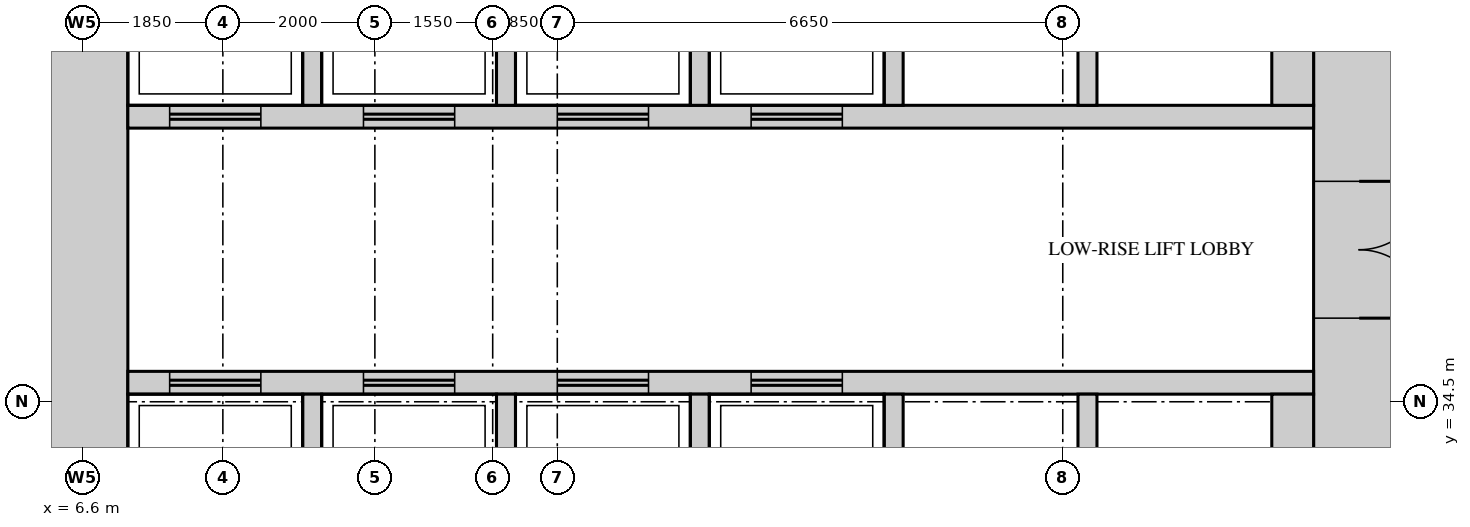
"""IFC4 building model, lengths in metres.
Left out: names, types, materials, properties, quantities, classifications, styles, units other than length and angle.
Written with IfcOpenShell. Run it as: python <this file> out.ifc"""

import sys

from ifc_helpers import new_model, si_unit, direction, frame, frame_2d, origin, place, context, subcontext, project, spatial, rectangle, extrude, source, transform, mapped, element, fill, save


model = new_model("IFC4")
c1 = context("Model", 3, precision=1e-05, world=origin(), true_north=direction((0.0, 1.0)))
c2 = subcontext(c1, "Body", "Model", "MODEL_VIEW")
j1 = project(units=[si_unit("LENGTHUNIT", "METRE"), si_unit("PLANEANGLEUNIT", "RADIAN")], contexts=[c1])
p1 = place(None, origin())
s1 = spatial("IfcSite", under=j1, at=p1, CompositionType="ELEMENT")
p2 = place(p1, origin())
s2 = spatial("IfcBuilding", under=s1, at=p2, CompositionType="ELEMENT")
p3 = place(p2, frame((0.0, 0.0, 87.0)))
s3 = spatial("IfcBuildingStorey", under=s2, at=p3, CompositionType="ELEMENT", Elevation=87.0)
m1 = source(origin(), c2, "Body", "SweptSolid", [
    extrude(rectangle(XDim=27.6, YDim=1.2, at=frame_2d((13.8, 0.0))), origin(), (0.0, 0.0, 1.0), 4.2),
])
p4 = place(p3, frame((23.4, 13.2, 0.0), z_axis=(0.0, 0.0, 1.0), x_axis=(0.0, 1.0, 0.0)))
e1 = element("IfcWall", 1, at=p4, inside=s3, PredefinedType="SHEAR", context=c2, shape_type="MappedRepresentation", body=[
    mapped(m1, transform((0.0, 0.0, 0.0))),
])
m2 = source(origin(), c2, "Body", "SweptSolid", [
    extrude(rectangle(XDim=1.8, YDim=2.1, at=frame_2d((0.9, 1.05))), frame((0.0, 0.61, 0.0), z_axis=(0.0, -1.0, 0.0), x_axis=(1.0, 0.0, 0.0)), (0.0, 0.0, 1.0), 1.22),
])
p5 = place(p4, frame((22.4, 0.0, 0.0)))
e2 = element("IfcOpeningElement", 2, at=p5, cuts=e1, PredefinedType="OPENING", context=c2, shape_type="MappedRepresentation", body=[
    mapped(m2, transform((0.0, 0.0, 0.0))),
])
m3 = source(origin(), c2, "Body", "SweptSolid", [
    extrude(rectangle(XDim=1.2, YDim=2.1, at=frame_2d((0.6, 1.05))), frame((0.0, 0.61, 0.0), z_axis=(0.0, -1.0, 0.0), x_axis=(1.0, 0.0, 0.0)), (0.0, 0.0, 1.0), 1.22),
])
p6 = place(p4, frame((12.9, 0.0, 0.0)))
e3 = element("IfcOpeningElement", 3, at=p6, cuts=e1, PredefinedType="OPENING", context=c2, shape_type="MappedRepresentation", body=[
    mapped(m3, transform((0.0, 0.0, 0.0))),
])
m4 = source(origin(), c2, "Body", "SweptSolid", [
    extrude(rectangle(XDim=0.9, YDim=2.1, at=frame_2d((0.45, 1.05))), frame((0.0, 0.61, 0.0), z_axis=(0.0, -1.0, 0.0), x_axis=(1.0, 0.0, 0.0)), (0.0, 0.0, 1.0), 1.22),
])
p7 = place(p4, frame((2.0, 0.0, 0.0)))
e4 = element("IfcOpeningElement", 4, at=p7, cuts=e1, PredefinedType="OPENING", context=c2, shape_type="MappedRepresentation", body=[
    mapped(m4, transform((0.0, 0.0, 0.0))),
])
p8 = place(p4, frame((6.85, 0.0, 0.0)))
e5 = element("IfcOpeningElement", 5, at=p8, cuts=e1, PredefinedType="OPENING", context=c2, shape_type="MappedRepresentation", body=[
    mapped(m4, transform((0.0, 0.0, 0.0))),
])
p9 = place(p3, frame((6.6, 13.2, 0.0), z_axis=(0.0, 0.0, 1.0), x_axis=(0.0, 1.0, 0.0)))
e6 = element("IfcWall", 6, at=p9, inside=s3, PredefinedType="SHEAR", context=c2, shape_type="MappedRepresentation", body=[
    mapped(m1, transform((0.0, 0.0, 0.0))),
])
m5 = source(origin(), c2, "Body", "SweptSolid", [
    extrude(rectangle(XDim=15.6, YDim=0.3, at=frame_2d((7.8, 0.0))), origin(), (0.0, 0.0, 1.0), 4.2),
])
p10 = place(p3, frame((7.2, 38.25, 0.0), z_axis=(0.0, 0.0, 1.0), x_axis=(1.0, 0.0, 0.0)))
e7 = element("IfcWall", 7, at=p10, inside=s3, PredefinedType="STANDARD", context=c2, shape_type="MappedRepresentation", body=[
    mapped(m5, transform((0.0, 0.0, 0.0))),
])
m6 = source(origin(), c2, "Body", "SweptSolid", [
    extrude(rectangle(XDim=1.2, YDim=2.1, at=frame_2d((0.6, 1.05))), frame((0.0, 0.16, 0.0), z_axis=(0.0, -1.0, 0.0), x_axis=(1.0, 0.0, 0.0)), (0.0, 0.0, 1.0), 0.32),
])
p11 = place(p10, frame((0.55, 0.0, 0.0)))
e8 = element("IfcOpeningElement", 8, at=p11, cuts=e7, PredefinedType="OPENING", context=c2, shape_type="MappedRepresentation", body=[
    mapped(m6, transform((0.0, 0.0, 0.0))),
])
p12 = place(p10, frame((3.1, 0.0, 0.0)))
e9 = element("IfcOpeningElement", 9, at=p12, cuts=e7, PredefinedType="OPENING", context=c2, shape_type="MappedRepresentation", body=[
    mapped(m6, transform((0.0, 0.0, 0.0))),
])
p13 = place(p10, frame((5.65, 0.0, 0.0)))
e10 = element("IfcOpeningElement", 10, at=p13, cuts=e7, PredefinedType="OPENING", context=c2, shape_type="MappedRepresentation", body=[
    mapped(m6, transform((0.0, 0.0, 0.0))),
])
p14 = place(p10, frame((8.2, 0.0, 0.0)))
e11 = element("IfcOpeningElement", 11, at=p14, cuts=e7, PredefinedType="OPENING", context=c2, shape_type="MappedRepresentation", body=[
    mapped(m6, transform((0.0, 0.0, 0.0))),
])
p15 = place(p3, frame((7.2, 34.75, 0.0), z_axis=(0.0, 0.0, 1.0), x_axis=(1.0, 0.0, 0.0)))
e12 = element("IfcWall", 12, at=p15, inside=s3, PredefinedType="STANDARD", context=c2, shape_type="MappedRepresentation", body=[
    mapped(m5, transform((0.0, 0.0, 0.0))),
])
p16 = place(p15, frame((0.55, 0.0, 0.0)))
e13 = element("IfcOpeningElement", 13, at=p16, cuts=e12, PredefinedType="OPENING", context=c2, shape_type="MappedRepresentation", body=[
    mapped(m6, transform((0.0, 0.0, 0.0))),
])
p17 = place(p15, frame((3.1, 0.0, 0.0)))
e14 = element("IfcOpeningElement", 14, at=p17, cuts=e12, PredefinedType="OPENING", context=c2, shape_type="MappedRepresentation", body=[
    mapped(m6, transform((0.0, 0.0, 0.0))),
])
p18 = place(p15, frame((5.65, 0.0, 0.0)))
e15 = element("IfcOpeningElement", 15, at=p18, cuts=e12, PredefinedType="OPENING", context=c2, shape_type="MappedRepresentation", body=[
    mapped(m6, transform((0.0, 0.0, 0.0))),
])
p19 = place(p15, frame((8.2, 0.0, 0.0)))
e16 = element("IfcOpeningElement", 16, at=p19, cuts=e12, PredefinedType="OPENING", context=c2, shape_type="MappedRepresentation", body=[
    mapped(m6, transform((0.0, 0.0, 0.0))),
])
m7 = source(origin(), c2, "Body", "SweptSolid", [
    extrude(rectangle(XDim=2.4, YDim=0.25, at=frame_2d((1.2, 0.0))), origin(), (0.0, 0.0, 1.0), 4.2),
])
for number, where, z_axis, x_axis in (
    (17, (9.625, 38.4, 0.0), (0.0, 0.0, 1.0), (0.0, 1.0, 0.0)),
    (18, (12.175, 38.4, 0.0), (0.0, 0.0, 1.0), (0.0, 1.0, 0.0)),
    (19, (14.725, 38.4, 0.0), (0.0, 0.0, 1.0), (0.0, 1.0, 0.0)),
    (20, (17.275, 38.4, 0.0), (0.0, 0.0, 1.0), (0.0, 1.0, 0.0)),
    (21, (19.825, 38.4, 0.0), (0.0, 0.0, 1.0), (0.0, 1.0, 0.0)),
):
    element("IfcWall", number, at=place(p3, frame(where, z_axis=z_axis, x_axis=x_axis)), inside=s3, PredefinedType="STANDARD", context=c2, shape_type="MappedRepresentation", body=[
        mapped(m7, transform((0.0, 0.0, 0.0))),
    ])
m8 = source(origin(), c2, "Body", "SweptSolid", [
    extrude(rectangle(XDim=2.4, YDim=0.55, at=frame_2d((1.2, 0.0))), origin(), (0.0, 0.0, 1.0), 4.2),
])
p20 = place(p3, frame((22.525, 38.4, 0.0), z_axis=(0.0, 0.0, 1.0), x_axis=(0.0, 1.0, 0.0)))
e22 = element("IfcWall", 22, at=p20, inside=s3, PredefinedType="STANDARD", context=c2, shape_type="MappedRepresentation", body=[
    mapped(m8, transform((0.0, 0.0, 0.0))),
])
for number, where, z_axis, x_axis in (
    (23, (9.625, 32.2, 0.0), (0.0, 0.0, 1.0), (0.0, 1.0, 0.0)),
    (24, (12.175, 32.2, 0.0), (0.0, 0.0, 1.0), (0.0, 1.0, 0.0)),
    (25, (14.725, 32.2, 0.0), (0.0, 0.0, 1.0), (0.0, 1.0, 0.0)),
    (26, (17.275, 32.2, 0.0), (0.0, 0.0, 1.0), (0.0, 1.0, 0.0)),
    (27, (19.825, 32.2, 0.0), (0.0, 0.0, 1.0), (0.0, 1.0, 0.0)),
):
    element("IfcWall", number, at=place(p3, frame(where, z_axis=z_axis, x_axis=x_axis)), inside=s3, PredefinedType="STANDARD", context=c2, shape_type="MappedRepresentation", body=[
        mapped(m7, transform((0.0, 0.0, 0.0))),
    ])
p21 = place(p3, frame((22.525, 32.2, 0.0), z_axis=(0.0, 0.0, 1.0), x_axis=(0.0, 1.0, 0.0)))
e28 = element("IfcWall", 28, at=p21, inside=s3, PredefinedType="STANDARD", context=c2, shape_type="MappedRepresentation", body=[
    mapped(m8, transform((0.0, 0.0, 0.0))),
])
m9 = source(origin(), c2, "Body", "SweptSolid", [
    extrude(rectangle(XDim=1.8, YDim=2.1, at=frame_2d((0.9, 1.05))), frame((0.0, 0.55, 0.0), z_axis=(0.0, -1.0, 0.0), x_axis=(1.0, 0.0, 0.0)), (0.0, 0.0, 1.0), 1.1),
])
p22 = place(p5, origin())
e29 = element("IfcDoor", 29, at=p22, inside=s3, OperationType="DOUBLE_DOOR_SINGLE_SWING", PredefinedType="DOOR", context=c2, shape_type="MappedRepresentation", body=[
    mapped(m9, transform((0.0, 0.0, 0.0))),
])
fill(e2, e29)
m10 = source(origin(), c2, "Body", "SweptSolid", [
    extrude(rectangle(XDim=1.2, YDim=2.1, at=frame_2d((0.6, 1.05))), frame((0.0, 0.025, 0.0), z_axis=(0.0, -1.0, 0.0), x_axis=(1.0, 0.0, 0.0)), (0.0, 0.0, 1.0), 0.05),
])
p23 = place(p16, origin())
e30 = element("IfcDoor", 30, at=p23, inside=s3, OperationType="DOUBLE_DOOR_SLIDING", PredefinedType="DOOR", context=c2, shape_type="MappedRepresentation", body=[
    mapped(m10, transform((0.0, 0.0, 0.0))),
])
fill(e13, e30)
p24 = place(p17, origin())
e31 = element("IfcDoor", 31, at=p24, inside=s3, OperationType="DOUBLE_DOOR_SLIDING", PredefinedType="DOOR", context=c2, shape_type="MappedRepresentation", body=[
    mapped(m10, transform((0.0, 0.0, 0.0))),
])
fill(e14, e31)
p25 = place(p18, origin())
e32 = element("IfcDoor", 32, at=p25, inside=s3, OperationType="DOUBLE_DOOR_SLIDING", PredefinedType="DOOR", context=c2, shape_type="MappedRepresentation", body=[
    mapped(m10, transform((0.0, 0.0, 0.0))),
])
fill(e15, e32)
p26 = place(p19, origin())
e33 = element("IfcDoor", 33, at=p26, inside=s3, OperationType="DOUBLE_DOOR_SLIDING", PredefinedType="DOOR", context=c2, shape_type="MappedRepresentation", body=[
    mapped(m10, transform((0.0, 0.0, 0.0))),
])
fill(e16, e33)
p27 = place(p11, origin())
e34 = element("IfcDoor", 34, at=p27, inside=s3, OperationType="DOUBLE_DOOR_SLIDING", PredefinedType="DOOR", context=c2, shape_type="MappedRepresentation", body=[
    mapped(m10, transform((0.0, 0.0, 0.0))),
])
fill(e8, e34)
p28 = place(p12, origin())
e35 = element("IfcDoor", 35, at=p28, inside=s3, OperationType="DOUBLE_DOOR_SLIDING", PredefinedType="DOOR", context=c2, shape_type="MappedRepresentation", body=[
    mapped(m10, transform((0.0, 0.0, 0.0))),
])
fill(e9, e35)
p29 = place(p13, origin())
e36 = element("IfcDoor", 36, at=p29, inside=s3, OperationType="DOUBLE_DOOR_SLIDING", PredefinedType="DOOR", context=c2, shape_type="MappedRepresentation", body=[
    mapped(m10, transform((0.0, 0.0, 0.0))),
])
fill(e10, e36)
p30 = place(p14, origin())
e37 = element("IfcDoor", 37, at=p30, inside=s3, OperationType="DOUBLE_DOOR_SLIDING", PredefinedType="DOOR", context=c2, shape_type="MappedRepresentation", body=[
    mapped(m10, transform((0.0, 0.0, 0.0))),
])
fill(e11, e37)
save(model, sys.argv[1])
